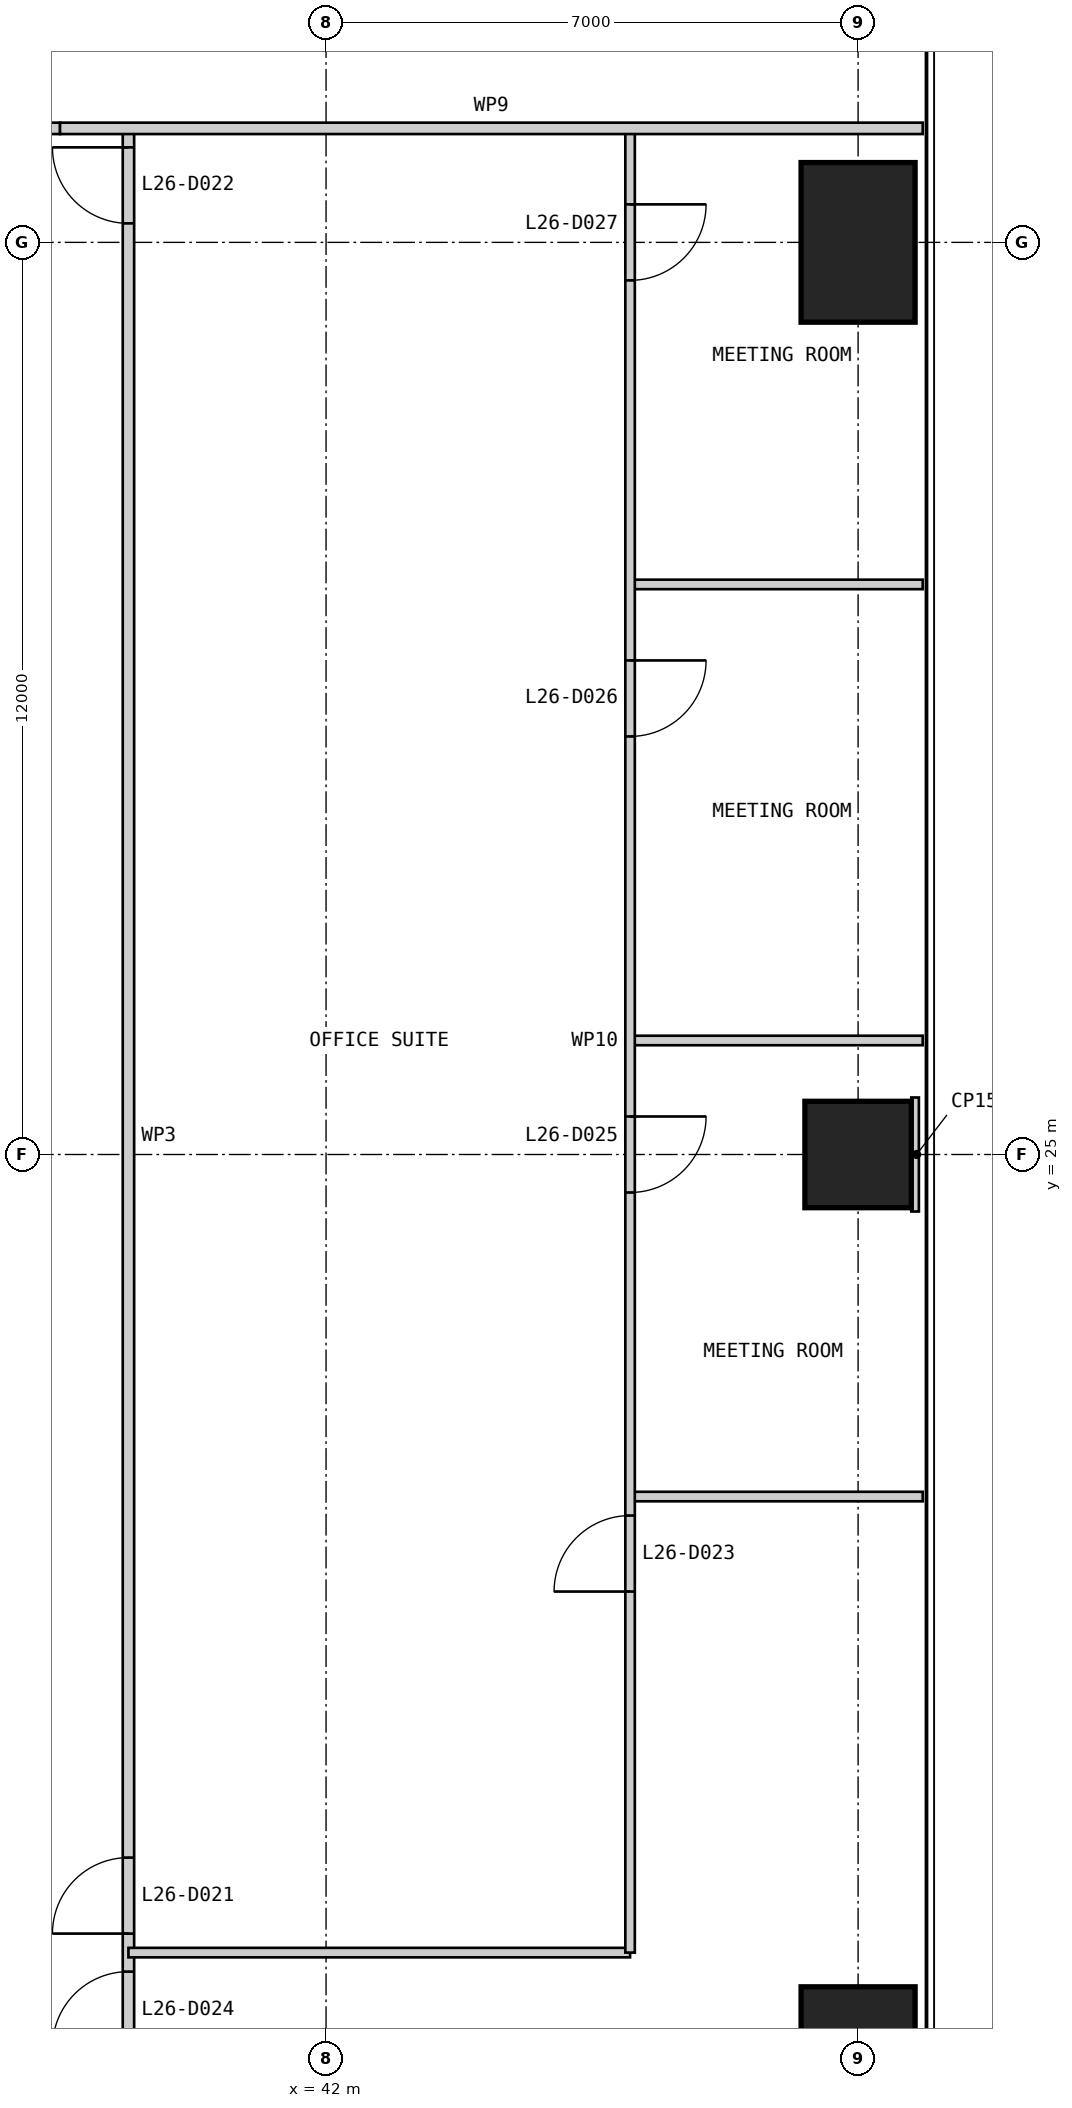
"""IFC4 building model, lengths in metres.
Left out: names, types, materials, properties, quantities, classifications, styles, units other than length and angle.
Written with IfcOpenShell. Run it as: python <this file> out.ifc"""

import sys

from ifc_helpers import new_model, si_unit, direction, frame, frame_2d, origin, origin_2d, place, context, subcontext, project, spatial, rectangle, extrude, element, fill, save


model = new_model("IFC4")
c1 = context("Model", 3, precision=1e-05, world=origin(), true_north=direction((0.0, 1.0)))
c2 = subcontext(c1, "Body", "Model", "MODEL_VIEW")
j1 = project(units=[si_unit("LENGTHUNIT", "METRE"), si_unit("PLANEANGLEUNIT", "RADIAN")], contexts=[c1])
p1 = place(None, origin())
s1 = spatial("IfcSite", under=j1, at=p1, CompositionType="ELEMENT")
p2 = place(p1, origin())
s2 = spatial("IfcBuilding", under=s1, at=p2, CompositionType="ELEMENT")
p3 = place(p2, frame((0.0, 0.0, 114.4)))
s3 = spatial("IfcBuildingStorey", under=s2, at=p3, CompositionType="ELEMENT", Elevation=114.4)
p4 = place(p3, frame((49.0, 13.0, 0.0), z_axis=(0.0, 0.0, 1.0), x_axis=(1.0, 0.0, 0.0)))
e1 = element("IfcColumn", 1, at=p4, inside=s3, PredefinedType="COLUMN", context=c2, shape_type="SweptSolid", body=[
    extrude(rectangle(XDim=1.5, YDim=2.1, at=origin_2d()), origin(), (0.0, 0.0, 1.0), 4.0),
])
p5 = place(p3, frame((49.0, 25.0, 0.0), z_axis=(0.0, 0.0, 1.0), x_axis=(1.0, 0.0, 0.0)))
e2 = element("IfcColumn", 2, at=p5, inside=s3, PredefinedType="COLUMN", context=c2, shape_type="SweptSolid", body=[
    extrude(rectangle(XDim=1.4, YDim=1.4, at=origin_2d()), origin(), (0.0, 0.0, 1.0), 4.0),
])
p6 = place(p3, frame((49.0, 37.0, 0.0), z_axis=(0.0, 0.0, 1.0), x_axis=(1.0, 0.0, 0.0)))
e3 = element("IfcColumn", 3, at=p6, inside=s3, PredefinedType="COLUMN", context=c2, shape_type="SweptSolid", body=[
    extrude(rectangle(XDim=1.5, YDim=2.1, at=origin_2d()), origin(), (0.0, 0.0, 1.0), 4.0),
])
p7 = place(p3, frame((39.4, 11.5, 0.0), z_axis=(0.0, 0.0, 1.0), x_axis=(0.0, 1.0, 0.0)))
e4 = element("IfcWall", 4, at=p7, inside=s3, PredefinedType="PARTITIONING", context=c2, shape_type="SweptSolid", body=[
    extrude(rectangle(XDim=27.0, YDim=0.15, at=frame_2d((13.5, 0.0))), origin(), (0.0, 0.0, 1.0), 3.85),
])
p8 = place(p7, frame((3.25, 0.0, 0.0)))
e5 = element("IfcOpeningElement", 5, at=p8, cuts=e4, PredefinedType="OPENING", context=c2, shape_type="SweptSolid", body=[
    extrude(rectangle(XDim=1.0, YDim=2.2, at=frame_2d((0.5, 1.1))), frame((0.0, 0.085, 0.0), z_axis=(0.0, -1.0, 0.0), x_axis=(1.0, 0.0, 0.0)), (0.0, 0.0, 1.0), 0.17),
])
p9 = place(p7, frame((25.75, 0.0, 0.0)))
e6 = element("IfcOpeningElement", 6, at=p9, cuts=e4, PredefinedType="OPENING", context=c2, shape_type="SweptSolid", body=[
    extrude(rectangle(XDim=1.0, YDim=2.2, at=frame_2d((0.5, 1.1))), frame((0.0, 0.085, 0.0), z_axis=(0.0, -1.0, 0.0), x_axis=(1.0, 0.0, 0.0)), (0.0, 0.0, 1.0), 0.17),
])
p10 = place(p7, frame((1.75, 0.0, 0.0)))
e7 = element("IfcOpeningElement", 7, at=p10, cuts=e4, PredefinedType="OPENING", context=c2, shape_type="SweptSolid", body=[
    extrude(rectangle(XDim=1.0, YDim=2.2, at=frame_2d((0.5, 1.1))), frame((0.0, 0.085, 0.0), z_axis=(0.0, -1.0, 0.0), x_axis=(1.0, 0.0, 0.0)), (0.0, 0.0, 1.0), 0.17),
])
p11 = place(p3, frame((46.0, 14.5, 0.0), z_axis=(0.0, 0.0, 1.0), x_axis=(-1.0, 0.0, 0.0)))
e8 = element("IfcWall", 8, at=p11, inside=s3, PredefinedType="PARTITIONING", context=c2, shape_type="SweptSolid", body=[
    extrude(rectangle(XDim=6.6, YDim=0.125, at=frame_2d((3.3, 0.0))), origin(), (0.0, 0.0, 1.0), 3.85),
])
for number, where, z_axis, x_axis in (
    (9, (49.85, 20.5, 0.0), (0.0, 0.0, 1.0), (-1.0, 0.0, 0.0)),
    (10, (49.85, 26.5, 0.0), (0.0, 0.0, 1.0), (-1.0, 0.0, 0.0)),
    (11, (49.85, 32.5, 0.0), (0.0, 0.0, 1.0), (-1.0, 0.0, 0.0)),
):
    element("IfcWall", number, at=place(p3, frame(where, z_axis=z_axis, x_axis=x_axis)), inside=s3, PredefinedType="PARTITIONING", context=c2, shape_type="SweptSolid", body=[
        extrude(rectangle(XDim=3.85, YDim=0.125, at=frame_2d((1.925, 0.0))), origin(), (0.0, 0.0, 1.0), 3.85),
    ])
p12 = place(p3, frame((46.0, 14.5, 0.0), z_axis=(0.0, 0.0, 1.0), x_axis=(0.0, 1.0, 0.0)))
e12 = element("IfcWall", 12, at=p12, inside=s3, PredefinedType="PARTITIONING", context=c2, shape_type="SweptSolid", body=[
    extrude(rectangle(XDim=24.0, YDim=0.125, at=frame_2d((12.0, 0.0))), origin(), (0.0, 0.0, 1.0), 3.238),
])
p13 = place(p12, frame((4.75, 0.0, 0.0)))
e13 = element("IfcOpeningElement", 13, at=p13, cuts=e12, PredefinedType="OPENING", context=c2, shape_type="SweptSolid", body=[
    extrude(rectangle(XDim=1.0, YDim=2.2, at=frame_2d((0.5, 1.1))), frame((0.0, 0.073, 0.0), z_axis=(0.0, -1.0, 0.0), x_axis=(1.0, 0.0, 0.0)), (0.0, 0.0, 1.0), 0.145),
])
p14 = place(p12, frame((10.0, 0.0, 0.0)))
e14 = element("IfcOpeningElement", 14, at=p14, cuts=e12, PredefinedType="OPENING", context=c2, shape_type="SweptSolid", body=[
    extrude(rectangle(XDim=1.0, YDim=2.2, at=frame_2d((0.5, 1.1))), frame((0.0, 0.073, 0.0), z_axis=(0.0, -1.0, 0.0), x_axis=(1.0, 0.0, 0.0)), (0.0, 0.0, 1.0), 0.145),
])
p15 = place(p12, frame((16.0, 0.0, 0.0)))
e15 = element("IfcOpeningElement", 15, at=p15, cuts=e12, PredefinedType="OPENING", context=c2, shape_type="SweptSolid", body=[
    extrude(rectangle(XDim=1.0, YDim=2.2, at=frame_2d((0.5, 1.1))), frame((0.0, 0.073, 0.0), z_axis=(0.0, -1.0, 0.0), x_axis=(1.0, 0.0, 0.0)), (0.0, 0.0, 1.0), 0.145),
])
p16 = place(p12, frame((22.0, 0.0, 0.0)))
e16 = element("IfcOpeningElement", 16, at=p16, cuts=e12, PredefinedType="OPENING", context=c2, shape_type="SweptSolid", body=[
    extrude(rectangle(XDim=1.0, YDim=2.2, at=frame_2d((0.5, 1.1))), frame((0.0, 0.073, 0.0), z_axis=(0.0, -1.0, 0.0), x_axis=(1.0, 0.0, 0.0)), (0.0, 0.0, 1.0), 0.145),
])
p17 = place(p3, frame((38.5, 38.5, 0.0), z_axis=(0.0, 0.0, 1.0), x_axis=(-1.0, 0.0, 0.0)))
e17 = element("IfcWall", 17, at=p17, inside=s3, PredefinedType="PARTITIONING", context=c2, shape_type="SweptSolid", body=[
    extrude(rectangle(XDim=27.0, YDim=0.15, at=frame_2d((13.5, 0.0))), origin(), (0.0, 0.0, 1.0), 3.85),
])
p18 = place(p17, frame((2.5, 0.0, 0.0)))
e18 = element("IfcOpeningElement", 18, at=p18, cuts=e17, PredefinedType="OPENING", context=c2, shape_type="SweptSolid", body=[
    extrude(rectangle(XDim=1.0, YDim=2.2, at=frame_2d((0.5, 1.1))), frame((0.0, 0.085, 0.0), z_axis=(0.0, -1.0, 0.0), x_axis=(1.0, 0.0, 0.0)), (0.0, 0.0, 1.0), 0.17),
])
p19 = place(p17, frame((16.0, 0.0, 0.0)))
e19 = element("IfcOpeningElement", 19, at=p19, cuts=e17, PredefinedType="OPENING", context=c2, shape_type="SweptSolid", body=[
    extrude(rectangle(XDim=1.0, YDim=2.2, at=frame_2d((0.5, 1.1))), frame((0.0, 0.085, 0.0), z_axis=(0.0, -1.0, 0.0), x_axis=(1.0, 0.0, 0.0)), (0.0, 0.0, 1.0), 0.17),
])
p20 = place(p3, frame((49.85, 38.5, 0.0), z_axis=(0.0, 0.0, 1.0), x_axis=(-1.0, 0.0, 0.0)))
e20 = element("IfcWall", 20, at=p20, inside=s3, PredefinedType="PARTITIONING", context=c2, shape_type="SweptSolid", body=[
    extrude(rectangle(XDim=11.35, YDim=0.15, at=frame_2d((5.675, 0.0))), origin(), (0.0, 0.0, 1.0), 3.85),
])
p21 = place(p3, frame((49.8, 25.0, 0.0), z_axis=(0.0, 0.0, 1.0), x_axis=(-1.0, 0.0, 0.0)))
e21 = element("IfcWall", 21, at=p21, inside=s3, PredefinedType="PARTITIONING", context=c2, shape_type="SweptSolid", body=[
    extrude(rectangle(XDim=0.1, YDim=1.5, at=frame_2d((0.05, 0.0))), origin(), (0.0, 0.0, 1.0), 3.85),
])
p22 = place(p8, origin())
e22 = element("IfcDoor", 22, at=p22, inside=s3, OperationType="SINGLE_SWING_LEFT", PredefinedType="DOOR", context=c2, shape_type="SweptSolid", body=[
    extrude(rectangle(XDim=1.0, YDim=2.2, at=frame_2d((0.5, 1.1))), frame((0.0, 0.025, 0.0), z_axis=(0.0, -1.0, 0.0), x_axis=(1.0, 0.0, 0.0)), (0.0, 0.0, 1.0), 0.05),
])
fill(e5, e22)
p23 = place(p9, origin())
e23 = element("IfcDoor", 23, at=p23, inside=s3, OperationType="SINGLE_SWING_RIGHT", PredefinedType="DOOR", context=c2, shape_type="SweptSolid", body=[
    extrude(rectangle(XDim=1.0, YDim=2.2, at=frame_2d((0.5, 1.1))), frame((0.0, 0.025, 0.0), z_axis=(0.0, -1.0, 0.0), x_axis=(1.0, 0.0, 0.0)), (0.0, 0.0, 1.0), 0.05),
])
fill(e6, e23)
p24 = place(p13, origin())
e24 = element("IfcDoor", 24, at=p24, inside=s3, OperationType="SINGLE_SWING_LEFT", PredefinedType="DOOR", context=c2, shape_type="SweptSolid", body=[
    extrude(rectangle(XDim=1.0, YDim=2.2, at=frame_2d((0.5, 1.1))), frame((0.0, 0.025, 0.0), z_axis=(0.0, -1.0, 0.0), x_axis=(1.0, 0.0, 0.0)), (0.0, 0.0, 1.0), 0.05),
])
fill(e13, e24)
p25 = place(p10, origin())
e25 = element("IfcDoor", 25, at=p25, inside=s3, OperationType="SINGLE_SWING_LEFT", PredefinedType="DOOR", context=c2, shape_type="SweptSolid", body=[
    extrude(rectangle(XDim=1.0, YDim=2.2, at=frame_2d((0.5, 1.1))), frame((0.0, 0.025, 0.0), z_axis=(0.0, -1.0, 0.0), x_axis=(1.0, 0.0, 0.0)), (0.0, 0.0, 1.0), 0.05),
])
fill(e7, e25)
p26 = place(p14, frame((1.0, 0.0, 0.0), z_axis=(0.0, 0.0, 1.0), x_axis=(-1.0, 0.0, 0.0)))
e26 = element("IfcDoor", 26, at=p26, inside=s3, OperationType="SINGLE_SWING_LEFT", PredefinedType="DOOR", context=c2, shape_type="SweptSolid", body=[
    extrude(rectangle(XDim=1.0, YDim=2.2, at=frame_2d((0.5, 1.1))), frame((0.0, 0.025, 0.0), z_axis=(0.0, -1.0, 0.0), x_axis=(1.0, 0.0, 0.0)), (0.0, 0.0, 1.0), 0.05),
])
fill(e14, e26)
p27 = place(p15, frame((1.0, 0.0, 0.0), z_axis=(0.0, 0.0, 1.0), x_axis=(-1.0, 0.0, 0.0)))
e27 = element("IfcDoor", 27, at=p27, inside=s3, OperationType="SINGLE_SWING_LEFT", PredefinedType="DOOR", context=c2, shape_type="SweptSolid", body=[
    extrude(rectangle(XDim=1.0, YDim=2.2, at=frame_2d((0.5, 1.1))), frame((0.0, 0.025, 0.0), z_axis=(0.0, -1.0, 0.0), x_axis=(1.0, 0.0, 0.0)), (0.0, 0.0, 1.0), 0.05),
])
fill(e15, e27)
p28 = place(p16, frame((1.0, 0.0, 0.0), z_axis=(0.0, 0.0, 1.0), x_axis=(-1.0, 0.0, 0.0)))
e28 = element("IfcDoor", 28, at=p28, inside=s3, OperationType="SINGLE_SWING_LEFT", PredefinedType="DOOR", context=c2, shape_type="SweptSolid", body=[
    extrude(rectangle(XDim=1.0, YDim=2.2, at=frame_2d((0.5, 1.1))), frame((0.0, 0.025, 0.0), z_axis=(0.0, -1.0, 0.0), x_axis=(1.0, 0.0, 0.0)), (0.0, 0.0, 1.0), 0.05),
])
fill(e16, e28)
save(model, sys.argv[1])
